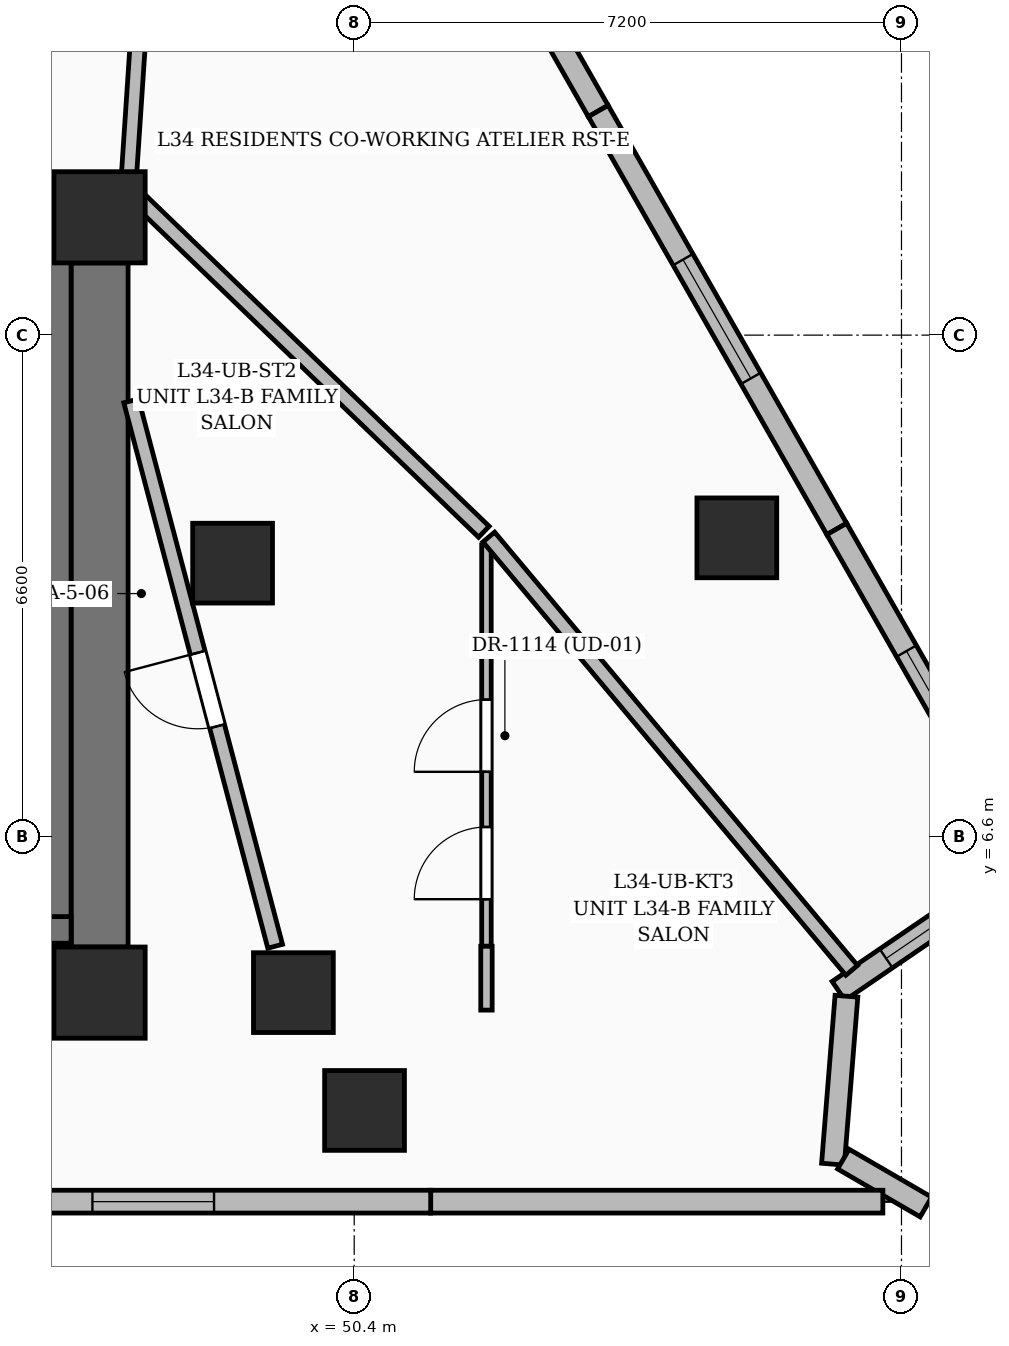
"""IFC4 building model, lengths in metres.
Left out: names, types, materials, properties, quantities, classifications, styles, units other than length and angle.
Written with IfcOpenShell. Run it as: python <this file> out.ifc"""

import sys

from ifc_helpers import new_model, si_unit, direction, frame, frame_2d, origin, origin_2d, place, context, subcontext, project, spatial, rectangle, extrude, element, fill, save


model = new_model("IFC4")
c1 = context("Model", 3, precision=1e-05, world=origin(), true_north=direction((0.0, 1.0)))
c2 = subcontext(c1, "Body", "Model", "MODEL_VIEW")
j1 = project(units=[si_unit("LENGTHUNIT", "METRE"), si_unit("PLANEANGLEUNIT", "RADIAN")], contexts=[c1])
p1 = place(None, origin())
s1 = spatial("IfcSite", under=j1, at=p1, CompositionType="ELEMENT")
p2 = place(p1, origin())
s2 = spatial("IfcBuilding", under=s1, at=p2, CompositionType="ELEMENT")
p3 = place(p2, frame((0.0, 0.0, 135.6)))
s3 = spatial("IfcBuildingStorey", under=s2, at=p3, CompositionType="ELEMENT", Elevation=135.6)
for number, where, z_axis, x_axis in (
    (1, (47.05, 4.55, 0.0), (0.0, 0.0, 1.0), (1.0, 0.0, 0.0)),
    (2, (47.05, 14.75, 0.0), (0.0, 0.0, 1.0), (1.0, 0.0, 0.0)),
):
    element("IfcColumn", number, at=place(p3, frame(where, z_axis=z_axis, x_axis=x_axis)), inside=s3, PredefinedType="COLUMN", context=c2, shape_type="SweptSolid", body=[
        extrude(rectangle(XDim=1.2, YDim=1.2, at=origin_2d()), origin(), (0.0, 0.0, 1.0), 3.6),
    ])
for number, where, z_axis, x_axis in (
    (3, (49.6, 4.55, 0.0), (0.0, 0.0, 1.0), (1.0, 0.0, 0.0)),
    (4, (48.8, 10.2, 0.0), (0.0, 0.0, 1.0), (1.0, 0.0, 0.0)),
):
    element("IfcColumn", number, at=place(p3, frame(where, z_axis=z_axis, x_axis=x_axis)), inside=s3, PredefinedType="COLUMN", context=c2, shape_type="SweptSolid", body=[
        extrude(rectangle(XDim=1.05, YDim=1.05, at=origin_2d()), origin(), (0.0, 0.0, 1.0), 3.6),
    ])
p4 = place(p3, frame((35.75, 4.55, 0.0), z_axis=(0.0, 0.0, 1.0), x_axis=(1.0, 0.0, 0.0)))
e5 = element("IfcWall", 5, at=p4, inside=s3, PredefinedType="SHEAR", context=c2, shape_type="SweptSolid", body=[
    extrude(rectangle(XDim=10.7, YDim=0.75, at=frame_2d((5.35, 0.0))), origin(), (0.0, 0.0, 1.0), 3.6),
])
p5 = place(p3, frame((35.75, 14.75, 0.0), z_axis=(0.0, 0.0, 1.0), x_axis=(1.0, 0.0, 0.0)))
e6 = element("IfcWall", 6, at=p5, inside=s3, PredefinedType="SHEAR", context=c2, shape_type="SweptSolid", body=[
    extrude(rectangle(XDim=10.7, YDim=0.75, at=frame_2d((5.35, 0.0))), origin(), (0.0, 0.0, 1.0), 3.6),
])
p6 = place(p5, frame((1.025, 0.0, 0.0)))
e7 = element("IfcOpeningElement", 7, at=p6, cuts=e6, PredefinedType="OPENING", context=c2, shape_type="SweptSolid", body=[
    extrude(rectangle(XDim=1.05, YDim=2.15, at=frame_2d((0.525, 1.075))), frame((0.0, 0.385, 0.0), z_axis=(0.0, -1.0, 0.0), x_axis=(1.0, 0.0, 0.0)), (0.0, 0.0, 1.0), 0.77),
])
p7 = place(p5, frame((8.625, 0.0, 0.0)))
e8 = element("IfcOpeningElement", 8, at=p7, cuts=e6, PredefinedType="OPENING", context=c2, shape_type="SweptSolid", body=[
    extrude(rectangle(XDim=1.05, YDim=2.15, at=frame_2d((0.525, 1.075))), frame((0.0, 0.385, 0.0), z_axis=(0.0, -1.0, 0.0), x_axis=(1.0, 0.0, 0.0)), (0.0, 0.0, 1.0), 0.77),
])
p8 = place(p3, frame((47.05, 5.15, 0.0), z_axis=(0.0, 0.0, 1.0), x_axis=(0.0, 1.0, 0.0)))
e9 = element("IfcWall", 9, at=p8, inside=s3, PredefinedType="SHEAR", context=c2, shape_type="SweptSolid", body=[
    extrude(rectangle(XDim=9.0, YDim=0.75, at=frame_2d((4.5, 0.0))), origin(), (0.0, 0.0, 1.0), 3.6),
])
p9 = place(p3, frame((46.5, 5.2, 0.0), z_axis=(0.0, 0.0, 1.0), x_axis=(0.0, 1.0, 0.0)))
e10 = element("IfcWall", 10, at=p9, inside=s3, PredefinedType="SOLIDWALL", context=c2, shape_type="SweptSolid", body=[
    extrude(rectangle(XDim=9.175, YDim=0.35, at=frame_2d((4.587, 0.0))), origin(), (0.0, 0.0, 1.0), 3.6),
])
p10 = place(p3, frame((43.125, 5.375, 0.0), z_axis=(0.0, 0.0, 1.0), x_axis=(1.0, 0.0, 0.0)))
e11 = element("IfcWall", 11, at=p10, inside=s3, PredefinedType="SOLIDWALL", context=c2, shape_type="SweptSolid", body=[
    extrude(rectangle(XDim=3.55, YDim=0.35, at=frame_2d((1.775, 0.0))), origin(), (0.0, 0.0, 1.0), 3.6),
])
for number, where, z_axis, x_axis in (
    (12, (50.536, 3.0, 0.0), (0.0, 0.0, 1.0), (1.0, 0.0, 0.0)),
    (13, (55.434, 10.533, 0.0), (0.0, 0.0, 1.0), (1.0, 0.0, 0.0)),
):
    element("IfcColumn", number, at=place(p3, frame(where, z_axis=z_axis, x_axis=x_axis)), inside=s3, PredefinedType="COLUMN", context=c2, shape_type="SweptSolid", body=[
        extrude(rectangle(XDim=1.05, YDim=1.05, at=origin_2d()), origin(), (0.0, 0.0, 1.0), 3.6),
    ])
p11 = place(p3, frame((50.472, 21.646, 0.0), z_axis=(0.0, 0.0, 1.0), x_axis=(0.495731860518, -0.868475631476, 0.0)))
e14 = element("IfcWall", 14, at=p11, inside=s3, PredefinedType="SOLIDWALL", context=c2, shape_type="SweptSolid", body=[
    extrude(rectangle(XDim=6.33, YDim=0.3, at=frame_2d((3.165, 0.0))), origin(), (0.0, 0.0, 1.0), 3.35),
])
p12 = place(p11, frame((2.1, 0.0, 0.55)))
e15 = element("IfcOpeningElement", 15, at=p12, cuts=e14, PredefinedType="OPENING", context=c2, shape_type="SweptSolid", body=[
    extrude(rectangle(XDim=2.1, YDim=2.4, at=frame_2d((1.05, 1.2))), frame((0.0, 0.16, 0.0), z_axis=(0.0, -1.0, 0.0), x_axis=(1.0, 0.0, 0.0)), (0.0, 0.0, 1.0), 0.32),
])
p13 = place(p3, frame((53.611, 16.148, 0.0), z_axis=(0.0, 0.0, 1.0), x_axis=(0.495702771017, -0.868492235317, 0.0)))
e16 = element("IfcWall", 16, at=p13, inside=s3, PredefinedType="SOLIDWALL", context=c2, shape_type="SweptSolid", body=[
    extrude(rectangle(XDim=6.33, YDim=0.3, at=frame_2d((3.165, 0.0))), origin(), (0.0, 0.0, 1.0), 3.35),
])
p14 = place(p13, frame((2.25, 0.0, 0.6)))
e17 = element("IfcOpeningElement", 17, at=p14, cuts=e16, PredefinedType="OPENING", context=c2, shape_type="SweptSolid", body=[
    extrude(rectangle(XDim=1.8, YDim=2.1, at=frame_2d((0.9, 1.05))), frame((0.0, 0.16, 0.0), z_axis=(0.0, -1.0, 0.0), x_axis=(1.0, 0.0, 0.0)), (0.0, 0.0, 1.0), 0.32),
])
p15 = place(p3, frame((56.749, 10.65, 0.0), z_axis=(0.0, 0.0, 1.0), x_axis=(0.495702771017, -0.868492235317, 0.0)))
e18 = element("IfcWall", 18, at=p15, inside=s3, PredefinedType="SOLIDWALL", context=c2, shape_type="SweptSolid", body=[
    extrude(rectangle(XDim=6.33, YDim=0.3, at=frame_2d((3.165, 0.0))), origin(), (0.0, 0.0, 1.0), 3.35),
])
p16 = place(p15, frame((1.85, 0.0, 0.55)))
e19 = element("IfcOpeningElement", 19, at=p16, cuts=e18, PredefinedType="OPENING", context=c2, shape_type="SweptSolid", body=[
    extrude(rectangle(XDim=1.6, YDim=2.2, at=frame_2d((0.8, 1.1))), frame((0.0, 0.16, 0.0), z_axis=(0.0, -1.0, 0.0), x_axis=(1.0, 0.0, 0.0)), (0.0, 0.0, 1.0), 0.32),
])
p17 = place(p3, frame((58.608, 5.825, 0.0), z_axis=(0.0, 0.0, 1.0), x_axis=(-0.8261738865, -0.563415219234, 0.0)))
e20 = element("IfcWall", 20, at=p17, inside=s3, PredefinedType="SOLIDWALL", context=c2, shape_type="SweptSolid", body=[
    extrude(rectangle(XDim=2.222, YDim=0.3, at=frame_2d((1.111, 0.0))), origin(), (0.0, 0.0, 1.0), 3.35),
])
p18 = place(p17, frame((0.265, 0.0, 0.8)))
e21 = element("IfcOpeningElement", 21, at=p18, cuts=e20, PredefinedType="OPENING", context=c2, shape_type="SweptSolid", body=[
    extrude(rectangle(XDim=1.2, YDim=1.8, at=frame_2d((0.6, 0.9))), frame((0.0, 0.16, 0.0), z_axis=(0.0, -1.0, 0.0), x_axis=(1.0, 0.0, 0.0)), (0.0, 0.0, 1.0), 0.32),
])
p19 = place(p3, frame((56.876, 4.502, 0.0), z_axis=(0.0, 0.0, 1.0), x_axis=(-0.079981668757, -0.996796334595, 0.0)))
e22 = element("IfcWall", 22, at=p19, inside=s3, PredefinedType="SOLIDWALL", context=c2, shape_type="SweptSolid", body=[
    extrude(rectangle(XDim=2.216, YDim=0.3, at=frame_2d((1.108, 0.0))), origin(), (0.0, 0.0, 1.0), 3.35),
])
p20 = place(p3, frame((56.835, 2.36, 0.0), z_axis=(0.0, 0.0, 1.0), x_axis=(0.864799842676, -0.502116751471, 0.0)))
e23 = element("IfcWall", 23, at=p20, inside=s3, PredefinedType="SOLIDWALL", context=c2, shape_type="SweptSolid", body=[
    extrude(rectangle(XDim=1.255, YDim=0.3, at=frame_2d((0.628, 0.0))), origin(), (0.0, 0.0, 1.0), 3.35),
])
p21 = place(p3, frame((57.355, 1.8, 0.0), z_axis=(0.0, 0.0, 1.0), x_axis=(-1.0, 0.0, 0.0)))
e24 = element("IfcWall", 24, at=p21, inside=s3, PredefinedType="SOLIDWALL", context=c2, shape_type="SweptSolid", body=[
    extrude(rectangle(XDim=5.949, YDim=0.3, at=frame_2d((2.975, 0.0))), origin(), (0.0, 0.0, 1.0), 3.35),
])
p22 = place(p3, frame((51.406, 1.8, 0.0), z_axis=(0.0, 0.0, 1.0), x_axis=(-1.0, 0.0, 0.0)))
e25 = element("IfcWall", 25, at=p22, inside=s3, PredefinedType="SOLIDWALL", context=c2, shape_type="SweptSolid", body=[
    extrude(rectangle(XDim=6.534, YDim=0.3, at=frame_2d((3.267, 0.0))), origin(), (0.0, 0.0, 1.0), 3.35),
])
p23 = place(p22, frame((2.85, 0.0, 0.55)))
e26 = element("IfcOpeningElement", 26, at=p23, cuts=e25, PredefinedType="OPENING", context=c2, shape_type="SweptSolid", body=[
    extrude(rectangle(XDim=1.6, YDim=2.2, at=frame_2d((0.8, 1.1))), frame((0.0, 0.16, 0.0), z_axis=(0.0, -1.0, 0.0), x_axis=(1.0, 0.0, 0.0)), (0.0, 0.0, 1.0), 0.32),
])
p24 = place(p3, frame((47.425, 15.125, 0.0), z_axis=(0.0, 0.0, 1.0), x_axis=(0.066537488357, 0.997783925829, 0.0)))
e27 = element("IfcWall", 27, at=p24, inside=s3, PredefinedType="PARTITIONING", context=c2, shape_type="SweptSolid", body=[
    extrude(rectangle(XDim=2.631, YDim=0.2, at=frame_2d((1.315, 0.0))), origin(), (0.0, 0.0, 1.0), 2.372),
])
p25 = place(p3, frame((49.36, 5.16, 0.0), z_axis=(0.0, 0.0, 1.0), x_axis=(-0.255255926347, 0.966873524337, 0.0)))
e28 = element("IfcWall", 28, at=p25, inside=s3, PredefinedType="PARTITIONING", context=c2, shape_type="SweptSolid", body=[
    extrude(rectangle(XDim=7.421, YDim=0.2, at=frame_2d((3.71, 0.0))), origin(), (0.0, 0.0, 1.0), 2.436),
])
p26 = place(p25, frame((2.993, 0.0, 0.0)))
e29 = element("IfcOpeningElement", 29, at=p26, cuts=e28, PredefinedType="OPENING", context=c2, shape_type="SweptSolid", body=[
    extrude(rectangle(XDim=1.0, YDim=2.2, at=frame_2d((0.5, 1.1))), frame((0.0, 0.11, 0.0), z_axis=(0.0, -1.0, 0.0), x_axis=(1.0, 0.0, 0.0)), (0.0, 0.0, 1.0), 0.22),
])
p27 = place(p3, frame((52.14, 5.16, 0.0), z_axis=(0.0, 0.0, 1.0), x_axis=(0.0, 1.0, 0.0)))
e30 = element("IfcWall", 30, at=p27, inside=s3, PredefinedType="PARTITIONING", context=c2, shape_type="SweptSolid", body=[
    extrude(rectangle(XDim=5.28, YDim=0.125, at=frame_2d((2.64, 0.0))), origin(), (0.0, 0.0, 1.0), 2.372),
])
p28 = place(p27, frame((2.295, 0.0, 0.0)))
e31 = element("IfcOpeningElement", 31, at=p28, cuts=e30, PredefinedType="OPENING", context=c2, shape_type="SweptSolid", body=[
    extrude(rectangle(XDim=0.95, YDim=2.2, at=frame_2d((0.475, 1.1))), frame((0.0, 0.072, 0.0), z_axis=(0.0, -1.0, 0.0), x_axis=(1.0, 0.0, 0.0)), (0.0, 0.0, 1.0), 0.145),
])
p29 = place(p27, frame((0.619, 0.0, 0.0)))
e32 = element("IfcOpeningElement", 32, at=p29, cuts=e30, PredefinedType="OPENING", context=c2, shape_type="SweptSolid", body=[
    extrude(rectangle(XDim=0.95, YDim=2.2, at=frame_2d((0.475, 1.1))), frame((0.0, 0.072, 0.0), z_axis=(0.0, -1.0, 0.0), x_axis=(1.0, 0.0, 0.0)), (0.0, 0.0, 1.0), 0.145),
])
p30 = place(p3, frame((52.106, 10.613, 0.0), z_axis=(0.0, 0.0, 1.0), x_axis=(-0.719981442313, 0.693993316052, 0.0)))
e33 = element("IfcWall", 33, at=p30, inside=s3, PredefinedType="PARTITIONING", context=c2, shape_type="SweptSolid", body=[
    extrude(rectangle(XDim=6.416, YDim=0.2, at=frame_2d((3.208, 0.0))), origin(), (0.0, 0.0, 1.0), 2.372),
])
p31 = place(p3, frame((52.14, 5.16, 0.0), z_axis=(0.0, 0.0, 1.0), x_axis=(0.0, -1.0, 0.0)))
e34 = element("IfcWall", 34, at=p31, inside=s3, PredefinedType="PARTITIONING", context=c2, shape_type="SweptSolid", body=[
    extrude(rectangle(XDim=0.84, YDim=0.15, at=frame_2d((0.42, 0.0))), origin(), (0.0, 0.0, 1.0), 2.57),
])
p32 = place(p3, frame((56.945, 4.843, 0.0), z_axis=(0.0, 0.0, 1.0), x_axis=(-0.642074908455, 0.766641905933, 0.0)))
e35 = element("IfcWall", 35, at=p32, inside=s3, PredefinedType="PARTITIONING", context=c2, shape_type="SweptSolid", body=[
    extrude(rectangle(XDim=7.436, YDim=0.2, at=frame_2d((3.718, 0.0))), origin(), (0.0, 0.0, 1.0), 2.372),
])
p33 = place(p14, origin())
e36 = element("IfcWindow", 36, at=p33, inside=s3, PartitioningType="SINGLE_PANEL", PredefinedType="WINDOW", context=c2, shape_type="SweptSolid", body=[
    extrude(rectangle(XDim=1.8, YDim=2.1, at=frame_2d((0.9, 1.05))), frame((0.0, 0.03, 0.0), z_axis=(0.0, -1.0, 0.0), x_axis=(1.0, 0.0, 0.0)), (0.0, 0.0, 1.0), 0.06),
])
fill(e17, e36)
p34 = place(p16, origin())
e37 = element("IfcWindow", 37, at=p34, inside=s3, PartitioningType="SINGLE_PANEL", PredefinedType="WINDOW", context=c2, shape_type="SweptSolid", body=[
    extrude(rectangle(XDim=1.6, YDim=2.2, at=frame_2d((0.8, 1.1))), frame((0.0, 0.03, 0.0), z_axis=(0.0, -1.0, 0.0), x_axis=(1.0, 0.0, 0.0)), (0.0, 0.0, 1.0), 0.06),
])
fill(e19, e37)
p35 = place(p18, origin())
e38 = element("IfcWindow", 38, at=p35, inside=s3, PartitioningType="SINGLE_PANEL", PredefinedType="WINDOW", context=c2, shape_type="SweptSolid", body=[
    extrude(rectangle(XDim=1.2, YDim=1.8, at=frame_2d((0.6, 0.9))), frame((0.0, 0.03, 0.0), z_axis=(0.0, -1.0, 0.0), x_axis=(1.0, 0.0, 0.0)), (0.0, 0.0, 1.0), 0.06),
])
fill(e21, e38)
p36 = place(p23, origin())
e39 = element("IfcWindow", 39, at=p36, inside=s3, PartitioningType="SINGLE_PANEL", PredefinedType="WINDOW", context=c2, shape_type="SweptSolid", body=[
    extrude(rectangle(XDim=1.6, YDim=2.2, at=frame_2d((0.8, 1.1))), frame((0.0, 0.03, 0.0), z_axis=(0.0, -1.0, 0.0), x_axis=(1.0, 0.0, 0.0)), (0.0, 0.0, 1.0), 0.06),
])
fill(e26, e39)
p37 = place(p28, origin())
e40 = element("IfcDoor", 40, at=p37, inside=s3, OperationType="SINGLE_SWING_LEFT", PredefinedType="DOOR", context=c2, shape_type="SweptSolid", body=[
    extrude(rectangle(XDim=0.95, YDim=2.2, at=frame_2d((0.475, 1.1))), frame((0.0, 0.025, 0.0), z_axis=(0.0, -1.0, 0.0), x_axis=(1.0, 0.0, 0.0)), (0.0, 0.0, 1.0), 0.05),
])
fill(e31, e40)
p38 = place(p26, origin())
e41 = element("IfcDoor", 41, at=p38, inside=s3, OperationType="SINGLE_SWING_RIGHT", PredefinedType="DOOR", context=c2, shape_type="SweptSolid", body=[
    extrude(rectangle(XDim=1.0, YDim=2.2, at=frame_2d((0.5, 1.1))), frame((0.0, 0.025, 0.0), z_axis=(0.0, -1.0, 0.0), x_axis=(1.0, 0.0, 0.0)), (0.0, 0.0, 1.0), 0.05),
])
fill(e29, e41)
p39 = place(p29, origin())
e42 = element("IfcDoor", 42, at=p39, inside=s3, OperationType="SINGLE_SWING_LEFT", PredefinedType="DOOR", context=c2, shape_type="SweptSolid", body=[
    extrude(rectangle(XDim=0.95, YDim=2.2, at=frame_2d((0.475, 1.1))), frame((0.0, 0.025, 0.0), z_axis=(0.0, -1.0, 0.0), x_axis=(1.0, 0.0, 0.0)), (0.0, 0.0, 1.0), 0.05),
])
fill(e32, e42)
save(model, sys.argv[1])
